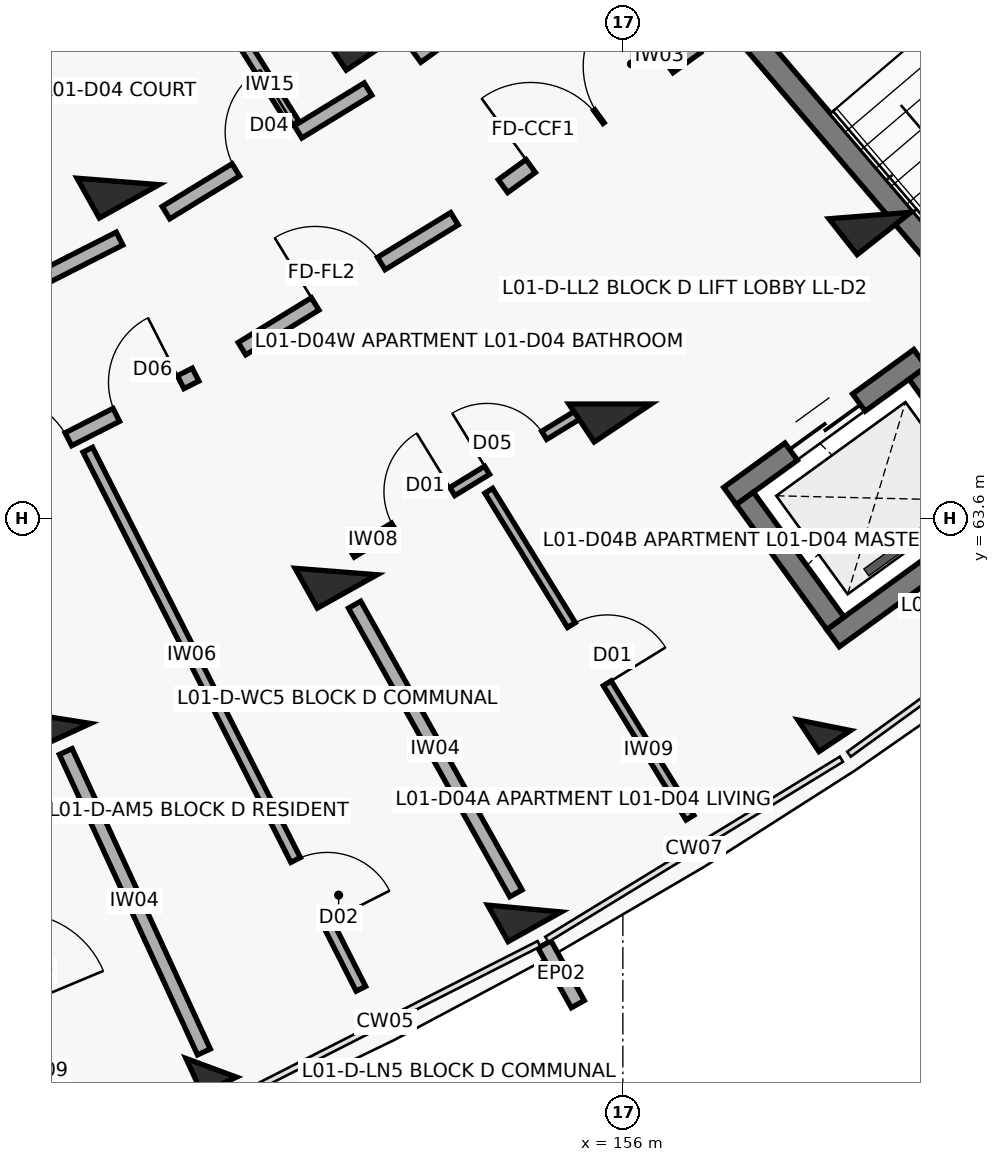
"""IFC4 building model, lengths in metres.
Left out: names, types, materials, properties, quantities, classifications, styles, units other than length and angle.
Written with IfcOpenShell. Run it as: python <this file> out.ifc"""

import sys

from ifc_helpers import new_model, si_unit, direction, frame, frame_2d, origin, origin_2d, place, context, subcontext, project, spatial, rectangle, extrude, element, fill, save


model = new_model("IFC4")
c1 = context("Model", 3, precision=1e-05, world=origin(), true_north=direction((0.0, 1.0)))
c2 = subcontext(c1, "Body", "Model", "MODEL_VIEW")
j1 = project(units=[si_unit("LENGTHUNIT", "METRE"), si_unit("PLANEANGLEUNIT", "RADIAN")], contexts=[c1])
p1 = place(None, origin())
s1 = spatial("IfcSite", under=j1, at=p1, CompositionType="ELEMENT")
p2 = place(p1, origin())
s2 = spatial("IfcBuilding", under=s1, at=p2, CompositionType="ELEMENT")
p3 = place(p2, frame((0.0, 0.0, 4.5)))
s3 = spatial("IfcBuildingStorey", under=s2, at=p3, CompositionType="ELEMENT", Elevation=4.5)
p4 = place(p3, frame((148.461, 60.982, 0.0), z_axis=(0.0, 0.0, 1.0), x_axis=(0.417867073801, -0.908508177527, 0.0)))
e1 = element("IfcColumn", 1, at=p4, inside=s3, PredefinedType="COLUMN", context=c2, shape_type="SweptSolid", body=[
    extrude(rectangle(XDim=0.6, YDim=0.9, at=origin_2d()), origin(), (0.0, 0.0, 1.0), 3.6),
])
p5 = place(p3, frame((150.584, 56.367, 0.0), z_axis=(0.0, 0.0, 1.0), x_axis=(0.417867073801, -0.908508177527, 0.0)))
e2 = element("IfcColumn", 2, at=p5, inside=s3, PredefinedType="COLUMN", context=c2, shape_type="SweptSolid", body=[
    extrude(rectangle(XDim=0.5, YDim=0.5, at=origin_2d()), origin(), (0.0, 0.0, 1.0), 3.6),
])
for number, where, z_axis, x_axis in (
    (3, (149.358, 68.03, 0.0), (0.0, 0.0, 1.0), (0.488, -0.873, 0.0)),
    (4, (152.227, 62.897, 0.0), (0.0, 0.0, 1.0), (0.488, -0.873, 0.0)),
):
    element("IfcColumn", number, at=place(p3, frame(where, z_axis=z_axis, x_axis=x_axis)), inside=s3, PredefinedType="COLUMN", context=c2, shape_type="SweptSolid", body=[
        extrude(rectangle(XDim=0.6, YDim=0.9, at=origin_2d()), origin(), (0.0, 0.0, 1.0), 3.6),
    ])
p6 = place(p3, frame((154.705, 58.462, 0.0), z_axis=(0.0, 0.0, 1.0), x_axis=(0.487859659139, -0.87292207727, 0.0)))
e5 = element("IfcColumn", 5, at=p6, inside=s3, PredefinedType="COLUMN", context=c2, shape_type="SweptSolid", body=[
    extrude(rectangle(XDim=0.55, YDim=0.8, at=origin_2d()), origin(), (0.0, 0.0, 1.0), 3.6),
])
for number, where, z_axis, x_axis in (
    (6, (152.568, 69.993, 0.0), (0.0, 0.0, 1.0), (0.555, -0.832, 0.0)),
    (7, (155.831, 65.101, 0.0), (0.0, 0.0, 1.0), (0.555, -0.832, 0.0)),
):
    element("IfcColumn", number, at=place(p3, frame(where, z_axis=z_axis, x_axis=x_axis)), inside=s3, PredefinedType="COLUMN", context=c2, shape_type="SweptSolid", body=[
        extrude(rectangle(XDim=0.6, YDim=0.9, at=origin_2d()), origin(), (0.0, 0.0, 1.0), 3.6),
    ])
p7 = place(p3, frame((158.649, 60.875, 0.0), z_axis=(0.0, 0.0, 1.0), x_axis=(0.554844427448, -0.83195412213, 0.0)))
e8 = element("IfcColumn", 8, at=p7, inside=s3, PredefinedType="COLUMN", context=c2, shape_type="SweptSolid", body=[
    extrude(rectangle(XDim=0.5, YDim=0.5, at=origin_2d()), origin(), (0.0, 0.0, 1.0), 3.6),
])
p8 = place(p3, frame((159.25, 67.581, 0.0), z_axis=(0.0, 0.0, 1.0), x_axis=(0.618408395358, -0.785856893175, 0.0)))
e9 = element("IfcColumn", 9, at=p8, inside=s3, PredefinedType="COLUMN", context=c2, shape_type="SweptSolid", body=[
    extrude(rectangle(XDim=0.6, YDim=0.9, at=origin_2d()), origin(), (0.0, 0.0, 1.0), 3.6),
])
p9 = place(p3, frame((154.969, 57.991, 0.0), z_axis=(0.0, 0.0, 1.0), x_axis=(0.487967253808, -0.872861935939, 0.0)))
e10 = element("IfcWall", 10, at=p9, inside=s3, PredefinedType="PARAPET", context=c2, shape_type="SweptSolid", body=[
    extrude(rectangle(XDim=0.9, YDim=0.195, at=frame_2d((0.45, 0.0))), origin(), (0.0, 0.0, 1.0), 2.6),
])
p10 = place(p3, frame((157.583, 70.041, 0.0), z_axis=(0.0, 0.0, 1.0), x_axis=(0.648762810187, -0.760990680704, 0.0)))
e11 = element("IfcWall", 11, at=p10, inside=s3, PredefinedType="SHEAR", context=c2, shape_type="SweptSolid", body=[
    extrude(rectangle(XDim=7.69, YDim=0.3, at=frame_2d((3.845, 0.0))), origin(), (0.0, 0.0, 1.0), 3.6),
])
p11 = place(p3, frame((157.409, 63.89, 0.0), z_axis=(0.0, 0.0, 1.0), x_axis=(0.809510936031, 0.587104798521, 0.0)))
e12 = element("IfcWall", 12, at=p11, inside=s3, PredefinedType="SHEAR", context=c2, shape_type="SweptSolid", body=[
    extrude(rectangle(XDim=3.09, YDim=0.28, at=frame_2d((1.545, 0.0))), origin(), (0.0, 0.0, 1.0), 3.6),
])
p12 = place(p11, frame((0.995, 0.0, 0.0)))
e13 = element("IfcOpeningElement", 13, at=p12, cuts=e12, PredefinedType="OPENING", context=c2, shape_type="SweptSolid", body=[
    extrude(rectangle(XDim=1.1, YDim=2.15, at=frame_2d((0.55, 1.075))), frame((0.0, 0.15, 0.0), z_axis=(0.0, -1.0, 0.0), x_axis=(1.0, 0.0, 0.0)), (0.0, 0.0, 1.0), 0.3),
])
p13 = place(p3, frame((158.765, 62.021, 0.0), z_axis=(0.0, 0.0, 1.0), x_axis=(0.809548485838, 0.587053020669, 0.0)))
e14 = element("IfcWall", 14, at=p13, inside=s3, PredefinedType="SHEAR", context=c2, shape_type="SweptSolid", body=[
    extrude(rectangle(XDim=3.09, YDim=0.28, at=frame_2d((1.545, 0.0))), origin(), (0.0, 0.0, 1.0), 3.6),
])
p14 = place(p3, frame((157.604, 63.859, 0.0), z_axis=(0.0, 0.0, 1.0), x_axis=(0.587127188998, -0.809494696671, 0.0)))
e15 = element("IfcWall", 15, at=p14, inside=s3, PredefinedType="SHEAR", context=c2, shape_type="SweptSolid", body=[
    extrude(rectangle(XDim=2.03, YDim=0.28, at=frame_2d((1.015, 0.0))), origin(), (0.0, 0.0, 1.0), 3.6),
])
p15 = place(p3, frame((159.879, 65.509, 0.0), z_axis=(0.0, 0.0, 1.0), x_axis=(0.58704837408, -0.809551855344, 0.0)))
e16 = element("IfcWall", 16, at=p15, inside=s3, PredefinedType="SHEAR", context=c2, shape_type="SweptSolid", body=[
    extrude(rectangle(XDim=2.03, YDim=0.28, at=frame_2d((1.015, 0.0))), origin(), (0.0, 0.0, 1.0), 3.6),
])
p16 = place(p3, frame((146.837, 59.996, 0.0), z_axis=(0.0, 0.0, 1.0), x_axis=(0.385846225752, -0.922563108992, 0.0)))
e17 = element("IfcWall", 17, at=p16, inside=s3, PredefinedType="PARTITIONING", context=c2, shape_type="SweptSolid", body=[
    extrude(rectangle(XDim=4.9, YDim=0.12, at=frame_2d((2.45, 0.0))), origin(), (0.0, 0.0, 1.0), 2.58),
])
p17 = place(p16, frame((1.83, 0.0, 0.0)))
e18 = element("IfcOpeningElement", 18, at=p17, cuts=e17, PredefinedType="OPENING", context=c2, shape_type="SweptSolid", body=[
    extrude(rectangle(XDim=1.24, YDim=2.1, at=frame_2d((0.62, 1.05))), frame((0.0, 0.07, 0.0), z_axis=(0.0, -1.0, 0.0), x_axis=(1.0, 0.0, 0.0)), (0.0, 0.0, 1.0), 0.14),
])
p18 = place(p3, frame((147.457, 64.003, 0.0), z_axis=(0.0, 0.0, 1.0), x_axis=(0.891412167565, 0.45319349898, 0.0)))
e19 = element("IfcWall", 19, at=p18, inside=s3, PredefinedType="SOLIDWALL", context=c2, shape_type="SweptSolid", body=[
    extrude(rectangle(XDim=3.277, YDim=0.19, at=frame_2d((1.639, 0.0))), origin(), (0.0, 0.0, 1.0), 2.58),
])
p19 = place(p18, frame((0.28, 0.0, 0.0)))
e20 = element("IfcOpeningElement", 20, at=p19, cuts=e19, PredefinedType="OPENING", context=c2, shape_type="SweptSolid", body=[
    extrude(rectangle(XDim=1.12, YDim=2.15, at=frame_2d((0.56, 1.075))), frame((0.0, 0.105, 0.0), z_axis=(0.0, -1.0, 0.0), x_axis=(1.0, 0.0, 0.0)), (0.0, 0.0, 1.0), 0.21),
])
p20 = place(p18, frame((2.107, 0.0, 0.0)))
e21 = element("IfcOpeningElement", 21, at=p20, cuts=e19, PredefinedType="OPENING", context=c2, shape_type="SweptSolid", body=[
    extrude(rectangle(XDim=0.95, YDim=2.1, at=frame_2d((0.475, 1.05))), frame((0.0, 0.105, 0.0), z_axis=(0.0, -1.0, 0.0), x_axis=(1.0, 0.0, 0.0)), (0.0, 0.0, 1.0), 0.21),
])
p21 = place(p3, frame((146.6, 65.865, 0.0), z_axis=(0.0, 0.0, 1.0), x_axis=(0.891414101388, 0.453189695212, 0.0)))
e22 = element("IfcWall", 22, at=p21, inside=s3, PredefinedType="SOLIDWALL", context=c2, shape_type="SweptSolid", body=[
    extrude(rectangle(XDim=3.116, YDim=0.19, at=frame_2d((1.558, 0.0))), origin(), (0.0, 0.0, 1.0), 2.58),
])
p22 = place(p21, frame((1.088, 0.0, 0.0)))
e23 = element("IfcOpeningElement", 23, at=p22, cuts=e22, PredefinedType="OPENING", context=c2, shape_type="SweptSolid", body=[
    extrude(rectangle(XDim=0.94, YDim=2.1, at=frame_2d((0.47, 1.05))), frame((0.0, 0.105, 0.0), z_axis=(0.0, -1.0, 0.0), x_axis=(1.0, 0.0, 0.0)), (0.0, 0.0, 1.0), 0.21),
])
p23 = place(p3, frame((148.96, 64.499, 0.0), z_axis=(0.0, 0.0, 1.0), x_axis=(0.451912010816, -0.892062517137, 0.0)))
e24 = element("IfcWall", 24, at=p23, inside=s3, PredefinedType="PARTITIONING", context=c2, shape_type="SweptSolid", body=[
    extrude(rectangle(XDim=7.95, YDim=0.14, at=frame_2d((3.975, 0.0))), origin(), (0.0, 0.0, 1.0), 2.58),
])
p24 = place(p23, frame((6.05, 0.0, 0.0)))
e25 = element("IfcOpeningElement", 25, at=p24, cuts=e24, PredefinedType="OPENING", context=c2, shape_type="SweptSolid", body=[
    extrude(rectangle(XDim=0.92, YDim=2.1, at=frame_2d((0.46, 1.05))), frame((0.0, 0.08, 0.0), z_axis=(0.0, -1.0, 0.0), x_axis=(1.0, 0.0, 0.0)), (0.0, 0.0, 1.0), 0.16),
])
p25 = place(p3, frame((148.67, 60.528, 0.0), z_axis=(0.0, 0.0, 1.0), x_axis=(0.417837051164, -0.908521985796, 0.0)))
e26 = element("IfcWall", 26, at=p25, inside=s3, PredefinedType="SOLIDWALL", context=c2, shape_type="SweptSolid", body=[
    extrude(rectangle(XDim=4.35, YDim=0.185, at=frame_2d((2.175, 0.0))), origin(), (0.0, 0.0, 1.0), 2.58),
])
p26 = place(p3, frame((150.989, 65.829, 0.0), z_axis=(0.0, 0.0, 1.0), x_axis=(0.853090237845, 0.521763400492, 0.0)))
e27 = element("IfcWall", 27, at=p26, inside=s3, PredefinedType="SOLIDWALL", context=c2, shape_type="SweptSolid", body=[
    extrude(rectangle(XDim=3.277, YDim=0.19, at=frame_2d((1.638, 0.0))), origin(), (0.0, 0.0, 1.0), 2.58),
])
p27 = place(p26, frame((1.128, 0.0, 0.0)))
e28 = element("IfcOpeningElement", 28, at=p27, cuts=e27, PredefinedType="OPENING", context=c2, shape_type="SweptSolid", body=[
    extrude(rectangle(XDim=1.02, YDim=2.15, at=frame_2d((0.51, 1.075))), frame((0.0, 0.105, 0.0), z_axis=(0.0, -1.0, 0.0), x_axis=(1.0, 0.0, 0.0)), (0.0, 0.0, 1.0), 0.21),
])
p28 = place(p3, frame((149.989, 67.619, 0.0), z_axis=(0.0, 0.0, 1.0), x_axis=(0.853121049608, 0.5217130195, 0.0)))
e29 = element("IfcWall", 29, at=p28, inside=s3, PredefinedType="SOLIDWALL", context=c2, shape_type="SweptSolid", body=[
    extrude(rectangle(XDim=3.116, YDim=0.19, at=frame_2d((1.558, 0.0))), origin(), (0.0, 0.0, 1.0), 2.58),
])
p29 = place(p28, frame((1.078, 0.0, 0.0)))
e30 = element("IfcOpeningElement", 30, at=p29, cuts=e29, PredefinedType="OPENING", context=c2, shape_type="SweptSolid", body=[
    extrude(rectangle(XDim=0.96, YDim=2.1, at=frame_2d((0.48, 1.05))), frame((0.0, 0.105, 0.0), z_axis=(0.0, -1.0, 0.0), x_axis=(1.0, 0.0, 0.0)), (0.0, 0.0, 1.0), 0.21),
])
p30 = place(p3, frame((149.926, 71.583, 0.0), z_axis=(0.0, 0.0, 1.0), x_axis=(0.5303779416, -0.847761310196, 0.0)))
e31 = element("IfcWall", 31, at=p30, inside=s3, PredefinedType="PARTITIONING", context=c2, shape_type="SweptSolid", body=[
    extrude(rectangle(XDim=3.3, YDim=0.145, at=frame_2d((1.65, 0.0))), origin(), (0.0, 0.0, 1.0), 2.58),
])
p31 = place(p30, frame((1.21, 0.0, 0.0)))
e32 = element("IfcOpeningElement", 32, at=p31, cuts=e31, PredefinedType="OPENING", context=c2, shape_type="SweptSolid", body=[
    extrude(rectangle(XDim=0.88, YDim=2.1, at=frame_2d((0.44, 1.05))), frame((0.0, 0.083, 0.0), z_axis=(0.0, -1.0, 0.0), x_axis=(1.0, 0.0, 0.0)), (0.0, 0.0, 1.0), 0.165),
])
p32 = place(p3, frame((152.434, 63.141, 0.0), z_axis=(0.0, 0.0, 1.0), x_axis=(0.853089873067, 0.521763996909, 0.0)))
e33 = element("IfcWall", 33, at=p32, inside=s3, PredefinedType="PARTITIONING", context=c2, shape_type="SweptSolid", body=[
    extrude(rectangle(XDim=3.616, YDim=0.125, at=frame_2d((1.808, 0.0))), origin(), (0.0, 0.0, 1.0), 2.58),
])
p33 = place(p32, frame((0.65, 0.0, 0.0)))
e34 = element("IfcOpeningElement", 34, at=p33, cuts=e33, PredefinedType="OPENING", context=c2, shape_type="SweptSolid", body=[
    extrude(rectangle(XDim=0.9, YDim=2.1, at=frame_2d((0.45, 1.05))), frame((0.0, 0.073, 0.0), z_axis=(0.0, -1.0, 0.0), x_axis=(1.0, 0.0, 0.0)), (0.0, 0.0, 1.0), 0.145),
])
p34 = place(p32, frame((2.086, 0.0, 0.0)))
e35 = element("IfcOpeningElement", 35, at=p34, cuts=e33, PredefinedType="OPENING", context=c2, shape_type="SweptSolid", body=[
    extrude(rectangle(XDim=0.88, YDim=2.1, at=frame_2d((0.44, 1.05))), frame((0.0, 0.073, 0.0), z_axis=(0.0, -1.0, 0.0), x_axis=(1.0, 0.0, 0.0)), (0.0, 0.0, 1.0), 0.145),
])
p35 = place(p3, frame((154.235, 63.96, 0.0), z_axis=(0.0, 0.0, 1.0), x_axis=(0.524202618281, -0.851593573829, 0.0)))
e36 = element("IfcWall", 36, at=p35, inside=s3, PredefinedType="PARTITIONING", context=c2, shape_type="SweptSolid", body=[
    extrude(rectangle(XDim=5.05, YDim=0.12, at=frame_2d((2.525, 0.0))), origin(), (0.0, 0.0, 1.0), 2.58),
])
p36 = place(p35, frame((2.075, 0.0, 0.0)))
e37 = element("IfcOpeningElement", 37, at=p36, cuts=e36, PredefinedType="OPENING", context=c2, shape_type="SweptSolid", body=[
    extrude(rectangle(XDim=0.9, YDim=2.1, at=frame_2d((0.45, 1.05))), frame((0.0, 0.07, 0.0), z_axis=(0.0, -1.0, 0.0), x_axis=(1.0, 0.0, 0.0)), (0.0, 0.0, 1.0), 0.14),
])
p37 = place(p3, frame((152.471, 62.46, 0.0), z_axis=(0.0, 0.0, 1.0), x_axis=(0.487866639184, -0.872918176218, 0.0)))
e38 = element("IfcWall", 38, at=p37, inside=s3, PredefinedType="SOLIDWALL", context=c2, shape_type="SweptSolid", body=[
    extrude(rectangle(XDim=4.35, YDim=0.185, at=frame_2d((2.175, 0.0))), origin(), (0.0, 0.0, 1.0), 2.58),
])
p38 = place(p3, frame((154.423, 67.968, 0.0), z_axis=(0.0, 0.0, 1.0), x_axis=(0.809516127005, 0.587097641043, 0.0)))
e39 = element("IfcWall", 39, at=p38, inside=s3, PredefinedType="SOLIDWALL", context=c2, shape_type="SweptSolid", body=[
    extrude(rectangle(XDim=3.137, YDim=0.21, at=frame_2d((1.569, 0.0))), origin(), (0.0, 0.0, 1.0), 2.58),
])
p39 = place(p38, frame((0.45, 0.0, 0.0)))
e40 = element("IfcOpeningElement", 40, at=p39, cuts=e39, PredefinedType="OPENING", context=c2, shape_type="SweptSolid", body=[
    extrude(rectangle(XDim=1.1, YDim=2.15, at=frame_2d((0.55, 1.075))), frame((0.0, 0.115, 0.0), z_axis=(0.0, -1.0, 0.0), x_axis=(1.0, 0.0, 0.0)), (0.0, 0.0, 1.0), 0.23),
])
p40 = place(p38, frame((1.567, 0.0, 0.0)))
e41 = element("IfcOpeningElement", 41, at=p40, cuts=e39, PredefinedType="OPENING", context=c2, shape_type="SweptSolid", body=[
    extrude(rectangle(XDim=1.12, YDim=2.15, at=frame_2d((0.56, 1.075))), frame((0.0, 0.115, 0.0), z_axis=(0.0, -1.0, 0.0), x_axis=(1.0, 0.0, 0.0)), (0.0, 0.0, 1.0), 0.23),
])
p41 = place(p3, frame((153.285, 69.674, 0.0), z_axis=(0.0, 0.0, 1.0), x_axis=(0.809505174959, 0.587112741911, 0.0)))
e42 = element("IfcWall", 42, at=p41, inside=s3, PredefinedType="SOLIDWALL", context=c2, shape_type="SweptSolid", body=[
    extrude(rectangle(XDim=2.976, YDim=0.19, at=frame_2d((1.488, 0.0))), origin(), (0.0, 0.0, 1.0), 2.58),
])
p42 = place(p41, frame((0.928, 0.0, 0.0)))
e43 = element("IfcOpeningElement", 43, at=p42, cuts=e42, PredefinedType="OPENING", context=c2, shape_type="SweptSolid", body=[
    extrude(rectangle(XDim=1.12, YDim=2.15, at=frame_2d((0.56, 1.075))), frame((0.0, 0.105, 0.0), z_axis=(0.0, -1.0, 0.0), x_axis=(1.0, 0.0, 0.0)), (0.0, 0.0, 1.0), 0.21),
])
p43 = place(p12, origin())
e44 = element("IfcDoor", 44, at=p43, inside=s3, OperationType="DOUBLE_DOOR_SLIDING", PredefinedType="DOOR", context=c2, shape_type="SweptSolid", body=[
    extrude(rectangle(XDim=1.1, YDim=2.15, at=frame_2d((0.55, 1.075))), frame((0.0, 0.025, 0.0), z_axis=(0.0, -1.0, 0.0), x_axis=(1.0, 0.0, 0.0)), (0.0, 0.0, 1.0), 0.05),
])
fill(e13, e44)
p44 = place(p19, origin())
e45 = element("IfcDoor", 45, at=p44, inside=s3, OperationType="SINGLE_SWING_LEFT", PredefinedType="DOOR", context=c2, shape_type="SweptSolid", body=[
    extrude(rectangle(XDim=1.12, YDim=2.15, at=frame_2d((0.56, 1.075))), frame((0.0, 0.025, 0.0), z_axis=(0.0, -1.0, 0.0), x_axis=(1.0, 0.0, 0.0)), (0.0, 0.0, 1.0), 0.05),
])
fill(e20, e45)
p45 = place(p20, origin())
e46 = element("IfcDoor", 46, at=p45, inside=s3, OperationType="SINGLE_SWING_RIGHT", PredefinedType="DOOR", context=c2, shape_type="SweptSolid", body=[
    extrude(rectangle(XDim=0.95, YDim=2.1, at=frame_2d((0.475, 1.05))), frame((0.0, 0.025, 0.0), z_axis=(0.0, -1.0, 0.0), x_axis=(1.0, 0.0, 0.0)), (0.0, 0.0, 1.0), 0.05),
])
fill(e21, e46)
p46 = place(p24, origin())
e47 = element("IfcDoor", 47, at=p46, inside=s3, OperationType="SINGLE_SWING_RIGHT", PredefinedType="DOOR", context=c2, shape_type="SweptSolid", body=[
    extrude(rectangle(XDim=0.92, YDim=2.1, at=frame_2d((0.46, 1.05))), frame((0.0, 0.025, 0.0), z_axis=(0.0, -1.0, 0.0), x_axis=(1.0, 0.0, 0.0)), (0.0, 0.0, 1.0), 0.05),
])
fill(e25, e47)
p47 = place(p27, origin())
e48 = element("IfcDoor", 48, at=p47, inside=s3, OperationType="SINGLE_SWING_LEFT", PredefinedType="DOOR", context=c2, shape_type="SweptSolid", body=[
    extrude(rectangle(XDim=1.02, YDim=2.15, at=frame_2d((0.51, 1.075))), frame((0.0, 0.025, 0.0), z_axis=(0.0, -1.0, 0.0), x_axis=(1.0, 0.0, 0.0)), (0.0, 0.0, 1.0), 0.05),
])
fill(e28, e48)
p48 = place(p29, origin())
e49 = element("IfcDoor", 49, at=p48, inside=s3, OperationType="SINGLE_SWING_RIGHT", PredefinedType="DOOR", context=c2, shape_type="SweptSolid", body=[
    extrude(rectangle(XDim=0.96, YDim=2.1, at=frame_2d((0.48, 1.05))), frame((0.0, 0.025, 0.0), z_axis=(0.0, -1.0, 0.0), x_axis=(1.0, 0.0, 0.0)), (0.0, 0.0, 1.0), 0.05),
])
fill(e30, e49)
p49 = place(p33, origin())
e50 = element("IfcDoor", 50, at=p49, inside=s3, OperationType="SINGLE_SWING_RIGHT", PredefinedType="DOOR", context=c2, shape_type="SweptSolid", body=[
    extrude(rectangle(XDim=0.9, YDim=2.1, at=frame_2d((0.45, 1.05))), frame((0.0, 0.025, 0.0), z_axis=(0.0, -1.0, 0.0), x_axis=(1.0, 0.0, 0.0)), (0.0, 0.0, 1.0), 0.05),
])
fill(e34, e50)
p50 = place(p34, origin())
e51 = element("IfcDoor", 51, at=p50, inside=s3, OperationType="SINGLE_SWING_LEFT", PredefinedType="DOOR", context=c2, shape_type="SweptSolid", body=[
    extrude(rectangle(XDim=0.88, YDim=2.1, at=frame_2d((0.44, 1.05))), frame((0.0, 0.025, 0.0), z_axis=(0.0, -1.0, 0.0), x_axis=(1.0, 0.0, 0.0)), (0.0, 0.0, 1.0), 0.05),
])
fill(e35, e51)
p51 = place(p36, origin())
e52 = element("IfcDoor", 52, at=p51, inside=s3, OperationType="SINGLE_SWING_RIGHT", PredefinedType="DOOR", context=c2, shape_type="SweptSolid", body=[
    extrude(rectangle(XDim=0.9, YDim=2.1, at=frame_2d((0.45, 1.05))), frame((0.0, 0.025, 0.0), z_axis=(0.0, -1.0, 0.0), x_axis=(1.0, 0.0, 0.0)), (0.0, 0.0, 1.0), 0.05),
])
fill(e37, e52)
p52 = place(p39, origin())
e53 = element("IfcDoor", 53, at=p52, inside=s3, OperationType="SINGLE_SWING_LEFT", PredefinedType="DOOR", context=c2, shape_type="SweptSolid", body=[
    extrude(rectangle(XDim=1.1, YDim=2.15, at=frame_2d((0.55, 1.075))), frame((0.0, 0.025, 0.0), z_axis=(0.0, -1.0, 0.0), x_axis=(1.0, 0.0, 0.0)), (0.0, 0.0, 1.0), 0.05),
])
fill(e40, e53)
p53 = place(p40, origin())
e54 = element("IfcDoor", 54, at=p53, inside=s3, OperationType="SINGLE_SWING_RIGHT", PredefinedType="DOOR", context=c2, shape_type="SweptSolid", body=[
    extrude(rectangle(XDim=1.12, YDim=2.15, at=frame_2d((0.56, 1.075))), frame((0.0, 0.025, 0.0), z_axis=(0.0, -1.0, 0.0), x_axis=(1.0, 0.0, 0.0)), (0.0, 0.0, 1.0), 0.05),
])
fill(e41, e54)
save(model, sys.argv[1])
